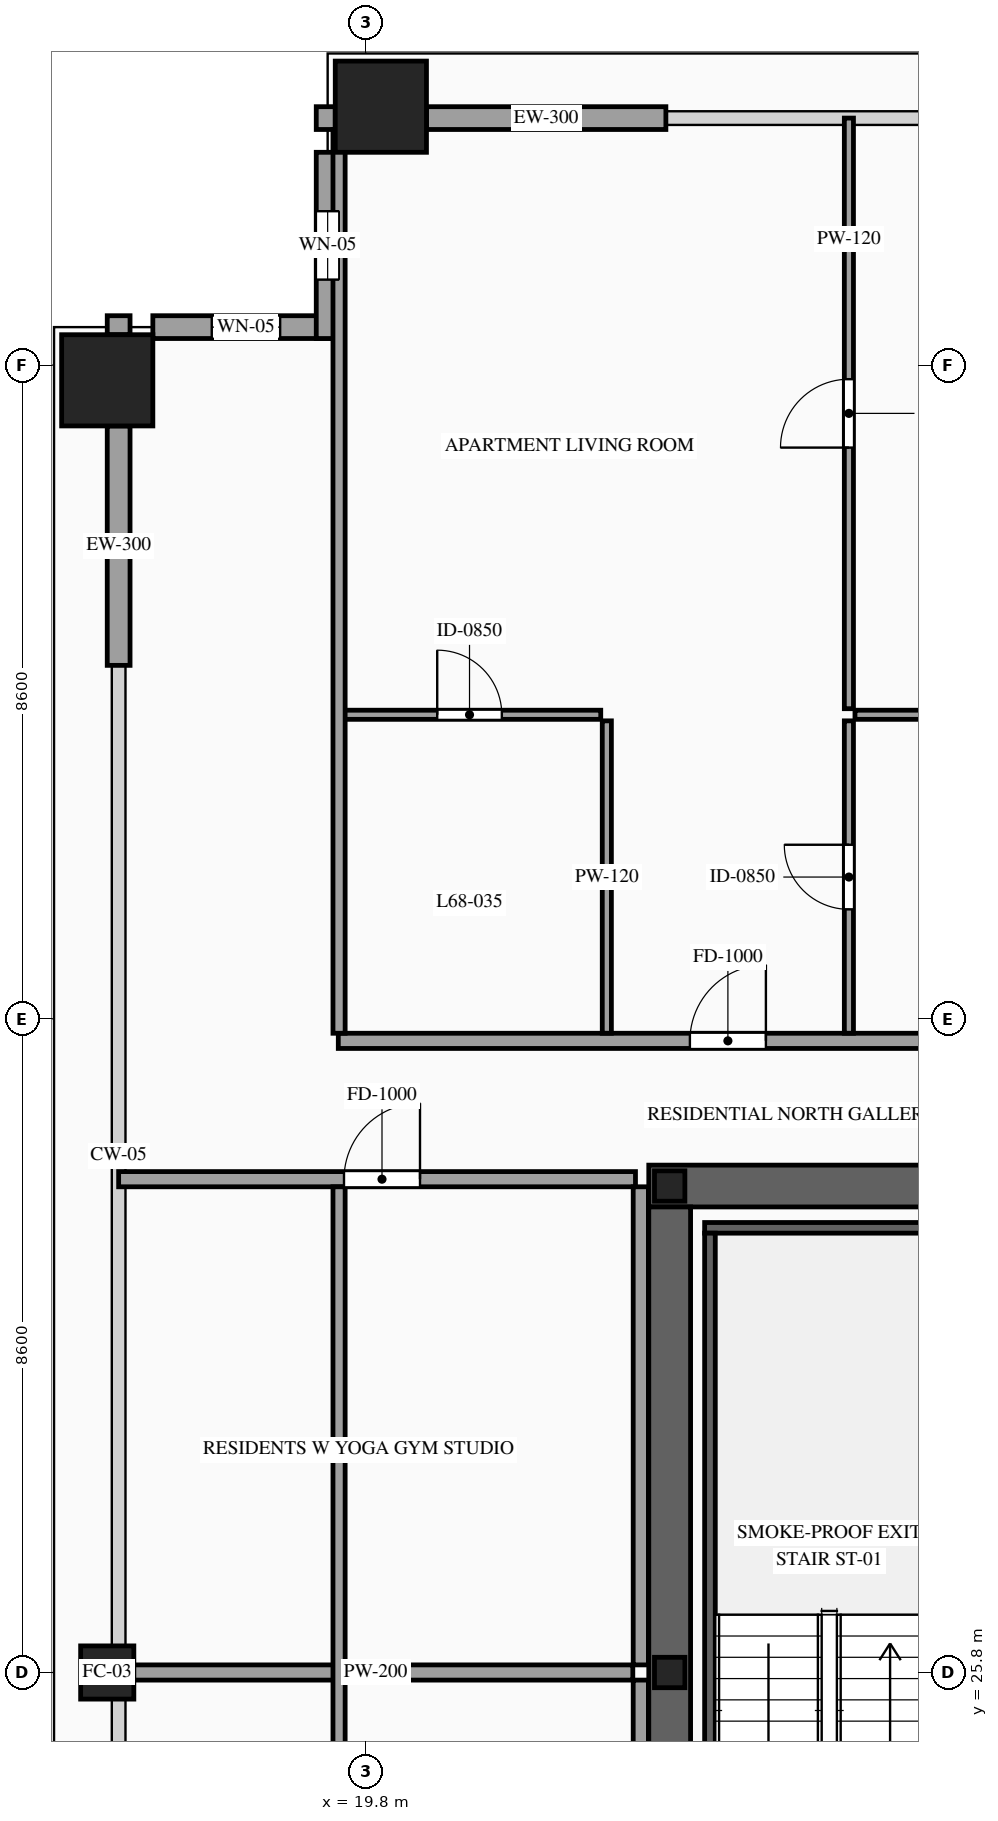
"""IFC4 building model, lengths in metres.
Left out: names, types, materials, properties, quantities, classifications, styles, units other than length and angle.
Written with IfcOpenShell. Run it as: python <this file> out.ifc"""

import sys

from ifc_helpers import new_model, si_unit, direction, frame, frame_2d, origin, origin_2d, place, context, subcontext, project, spatial, rectangle, hollow_rectangle, i_section, extrude, source, transform, mapped, element, fill, save


model = new_model("IFC4")
c1 = context("Model", 3, precision=1e-05, world=origin(), true_north=direction((0.0, 1.0)))
c2 = subcontext(c1, "Body", "Model", "MODEL_VIEW")
j1 = project(units=[si_unit("LENGTHUNIT", "METRE"), si_unit("PLANEANGLEUNIT", "RADIAN")], contexts=[c1])
p1 = place(None, origin())
s1 = spatial("IfcSite", under=j1, at=p1, CompositionType="ELEMENT")
p2 = place(p1, origin())
s2 = spatial("IfcBuilding", under=s1, at=p2, CompositionType="ELEMENT")
p3 = place(p2, frame((0.0, 0.0, 255.6)))
s3 = spatial("IfcBuildingStorey", under=s2, at=p3, CompositionType="ELEMENT", Elevation=255.6)
p4 = place(p3, frame((23.525, 32.2, 0.0), z_axis=(0.0, 0.0, 1.0), x_axis=(1.0, 0.0, 0.0)))
e1 = element("IfcWall", 1, at=p4, inside=s3, PredefinedType="SHEAR", context=c2, shape_type="SweptSolid", body=[
    extrude(rectangle(XDim=26.95, YDim=0.55, at=frame_2d((13.475, 0.0))), origin(), (0.0, 0.0, 1.0), 3.5),
])
p5 = place(p4, frame((4.545, 0.0, 0.0)))
e2 = element("IfcOpeningElement", 2, at=p5, cuts=e1, PredefinedType="OPENING", context=c2, shape_type="SweptSolid", body=[
    extrude(rectangle(XDim=0.9, YDim=2.15, at=frame_2d((0.45, 1.075))), frame((0.0, 0.29, 0.0), z_axis=(0.0, -1.0, 0.0), x_axis=(1.0, 0.0, 0.0)), (0.0, 0.0, 1.0), 0.58),
])
p6 = place(p4, frame((9.825, 0.0, 0.0)))
e3 = element("IfcOpeningElement", 3, at=p6, cuts=e1, PredefinedType="OPENING", context=c2, shape_type="SweptSolid", body=[
    extrude(rectangle(XDim=1.1, YDim=2.2, at=frame_2d((0.55, 1.1))), frame((0.0, 0.29, 0.0), z_axis=(0.0, -1.0, 0.0), x_axis=(1.0, 0.0, 0.0)), (0.0, 0.0, 1.0), 0.58),
])
p7 = place(p4, frame((15.675, 0.0, 0.0)))
e4 = element("IfcOpeningElement", 4, at=p7, cuts=e1, PredefinedType="OPENING", context=c2, shape_type="SweptSolid", body=[
    extrude(rectangle(XDim=1.1, YDim=2.2, at=frame_2d((0.55, 1.1))), frame((0.0, 0.29, 0.0), z_axis=(0.0, -1.0, 0.0), x_axis=(1.0, 0.0, 0.0)), (0.0, 0.0, 1.0), 0.58),
])
p8 = place(p4, frame((18.875, 0.0, 0.0)))
e5 = element("IfcOpeningElement", 5, at=p8, cuts=e1, PredefinedType="OPENING", context=c2, shape_type="SweptSolid", body=[
    extrude(rectangle(XDim=0.9, YDim=2.15, at=frame_2d((0.45, 1.075))), frame((0.0, 0.29, 0.0), z_axis=(0.0, -1.0, 0.0), x_axis=(1.0, 0.0, 0.0)), (0.0, 0.0, 1.0), 0.58),
])
m1 = source(origin(), c2, "Body", "SweptSolid", [
    extrude(rectangle(XDim=12.25, YDim=0.55, at=frame_2d((6.125, 0.0))), origin(), (0.0, 0.0, 1.0), 3.5),
])
p9 = place(p3, frame((23.8, 19.675, 0.0), z_axis=(0.0, 0.0, 1.0), x_axis=(0.0, 1.0, 0.0)))
e6 = element("IfcWall", 6, at=p9, inside=s3, PredefinedType="SHEAR", context=c2, shape_type="MappedRepresentation", body=[
    mapped(m1, transform((0.0, 0.0, 0.0), scale=1.0)),
])
m2 = source(origin(), c2, "Body", "SweptSolid", [
    extrude(i_section(OverallWidth=0.4, OverallDepth=0.4, WebThickness=0.013, FlangeThickness=0.021, at=origin_2d()), origin(), (0.0, 0.0, 1.0), 3.5),
])
for number, where, z_axis, x_axis in (
    (7, (23.8, 25.8, 0.0), (0.0, 0.0, 1.0), (1.0, 0.0, 0.0)),
    (8, (23.8, 32.2, 0.0), (0.0, 0.0, 1.0), (1.0, 0.0, 0.0)),
):
    element("IfcColumn", number, at=place(p3, frame(where, z_axis=z_axis, x_axis=x_axis)), inside=s3, PredefinedType="COLUMN", context=c2, shape_type="MappedRepresentation", body=[
        mapped(m2, transform((0.0, 0.0, 0.0), scale=1.0)),
    ])
m3 = source(origin(), c2, "Body", "SweptSolid", [
    extrude(hollow_rectangle(XDim=1.2, YDim=1.2, WallThickness=0.055, at=origin_2d()), origin(), (0.0, 0.0, 1.0), 3.5),
])
p10 = place(p3, frame((20.0, 46.4, 0.0), z_axis=(0.0, 0.0, 1.0), x_axis=(1.0, 0.0, 0.0)))
e9 = element("IfcColumn", 9, at=p10, inside=s3, PredefinedType="COLUMN", context=c2, shape_type="MappedRepresentation", body=[
    mapped(m3, transform((0.0, 0.0, 0.0), scale=1.0)),
])
m4 = source(origin(), c2, "Body", "SweptSolid", [
    extrude(hollow_rectangle(XDim=0.7, YDim=0.7, WallThickness=0.032, at=origin_2d()), origin(), (0.0, 0.0, 1.0), 3.5),
])
p11 = place(p3, frame((16.4, 25.8, 0.0), z_axis=(0.0, 0.0, 1.0), x_axis=(1.0, 0.0, 0.0)))
e10 = element("IfcColumn", 10, at=p11, inside=s3, PredefinedType="COLUMN", context=c2, shape_type="MappedRepresentation", body=[
    mapped(m4, transform((0.0, 0.0, 0.0), scale=1.0)),
])
p12 = place(p3, frame((16.4, 42.8, 0.0), z_axis=(0.0, 0.0, 1.0), x_axis=(1.0, 0.0, 0.0)))
e11 = element("IfcColumn", 11, at=p12, inside=s3, PredefinedType="COLUMN", context=c2, shape_type="MappedRepresentation", body=[
    mapped(m3, transform((0.0, 0.0, 0.0), scale=1.0)),
])
p13 = place(p3, frame((19.45, 43.5, 0.0), z_axis=(0.0, 0.0, 1.0), x_axis=(-1.0, 0.0, 0.0)))
e12 = element("IfcWall", 12, at=p13, inside=s3, PredefinedType="SOLIDWALL", context=c2, shape_type="SweptSolid", body=[
    extrude(rectangle(XDim=2.45, YDim=0.3, at=frame_2d((1.225, 0.0))), origin(), (0.0, 0.0, 1.0), 3.2),
])
p14 = place(p13, frame((0.775, 0.0, 0.75)))
e13 = element("IfcOpeningElement", 13, at=p14, cuts=e12, PredefinedType="OPENING", context=c2, shape_type="SweptSolid", body=[
    extrude(rectangle(XDim=0.9, YDim=1.5, at=frame_2d((0.45, 0.75))), frame((0.0, 0.165, 0.0), z_axis=(0.0, -1.0, 0.0), x_axis=(1.0, 0.0, 0.0)), (0.0, 0.0, 1.0), 0.33),
])
p15 = place(p3, frame((19.3, 45.8, 0.0), z_axis=(0.0, 0.0, 1.0), x_axis=(0.0, -1.0, 0.0)))
e14 = element("IfcWall", 14, at=p15, inside=s3, PredefinedType="SOLIDWALL", context=c2, shape_type="SweptSolid", body=[
    extrude(rectangle(XDim=2.45, YDim=0.3, at=frame_2d((1.225, 0.0))), origin(), (0.0, 0.0, 1.0), 3.2),
])
p16 = place(p15, frame((0.775, 0.0, 0.75)))
e15 = element("IfcOpeningElement", 15, at=p16, cuts=e14, PredefinedType="OPENING", context=c2, shape_type="SweptSolid", body=[
    extrude(rectangle(XDim=0.9, YDim=1.5, at=frame_2d((0.45, 0.75))), frame((0.0, 0.165, 0.0), z_axis=(0.0, -1.0, 0.0), x_axis=(1.0, 0.0, 0.0)), (0.0, 0.0, 1.0), 0.33),
])
m5 = source(origin(), c2, "Body", "SweptSolid", [
    extrude(rectangle(XDim=0.25, YDim=0.3, at=frame_2d((0.125, 0.0))), origin(), (0.0, 0.0, 1.0), 3.2),
])
for number, where, z_axis, x_axis in (
    (16, (19.15, 46.25, 0.0), (0.0, 0.0, 1.0), (1.0, 0.0, 0.0)),
    (17, (16.55, 43.4, 0.0), (0.0, 0.0, 1.0), (0.0, 1.0, 0.0)),
):
    element("IfcWall", number, at=place(p3, frame(where, z_axis=z_axis, x_axis=x_axis)), inside=s3, PredefinedType="SOLIDWALL", context=c2, shape_type="MappedRepresentation", body=[
        mapped(m5, transform((0.0, 0.0, 0.0), scale=1.0)),
    ])
m6 = source(origin(), c2, "Body", "SweptSolid", [
    extrude(rectangle(XDim=3.15, YDim=0.3, at=frame_2d((1.575, 0.0))), origin(), (0.0, 0.0, 1.0), 2.755),
])
for number, where, z_axis, x_axis in (
    (18, (20.6, 46.25, 0.0), (0.0, 0.0, 1.0), (1.0, 0.0, 0.0)),
    (19, (16.55, 39.05, 0.0), (0.0, 0.0, 1.0), (0.0, 1.0, 0.0)),
):
    element("IfcWall", number, at=place(p3, frame(where, z_axis=z_axis, x_axis=x_axis)), inside=s3, PredefinedType="SOLIDWALL", context=c2, shape_type="MappedRepresentation", body=[
        mapped(m6, transform((0.0, 0.0, 0.0), scale=1.0)),
    ])
m7 = source(origin(), c2, "Body", "SweptSolid", [
    extrude(rectangle(XDim=3.28, YDim=0.14, at=frame_2d((1.64, 0.0))), origin(), (0.0, 0.0, 1.0), 3.2),
])
p17 = place(p3, frame((24.26, 31.65, 0.0), z_axis=(0.0, 0.0, 1.0), x_axis=(1.0, 0.0, 0.0)))
e20 = element("IfcWall", 20, at=p17, inside=s3, PredefinedType="SOLIDWALL", context=c2, shape_type="MappedRepresentation", body=[
    mapped(m7, transform((0.0, 0.0, 0.0), scale=1.0)),
])
m8 = source(origin(), c2, "Body", "SweptSolid", [
    extrude(rectangle(XDim=8.94, YDim=0.14, at=frame_2d((4.47, 0.0))), origin(), (0.0, 0.0, 1.0), 3.2),
])
p18 = place(p3, frame((24.33, 22.64, 0.0), z_axis=(0.0, 0.0, 1.0), x_axis=(0.0, 1.0, 0.0)))
e21 = element("IfcWall", 21, at=p18, inside=s3, PredefinedType="SOLIDWALL", context=c2, shape_type="MappedRepresentation", body=[
    mapped(m8, transform((0.0, 0.0, 0.0), scale=1.0)),
])
p19 = place(p3, frame((19.44, 34.11, 0.0), z_axis=(0.0, 0.0, 1.0), x_axis=(1.0, 0.0, 0.0)))
e22 = element("IfcWall", 22, at=p19, inside=s3, PredefinedType="PARTITIONING", context=c2, shape_type="SweptSolid", body=[
    extrude(rectangle(XDim=11.51, YDim=0.2, at=frame_2d((5.755, 0.0))), origin(), (0.0, 0.0, 1.0), 3.2),
])
p20 = place(p19, frame((4.626, 0.0, 0.0)))
e23 = element("IfcOpeningElement", 23, at=p20, cuts=e22, PredefinedType="OPENING", context=c2, shape_type="SweptSolid", body=[
    extrude(rectangle(XDim=1.0, YDim=2.2, at=frame_2d((0.5, 1.1))), frame((0.0, 0.115, 0.0), z_axis=(0.0, -1.0, 0.0), x_axis=(1.0, 0.0, 0.0)), (0.0, 0.0, 1.0), 0.23),
])
p21 = place(p3, frame((19.44, 38.4, 0.0), z_axis=(0.0, 0.0, 1.0), x_axis=(1.0, 0.0, 0.0)))
e24 = element("IfcWall", 24, at=p21, inside=s3, PredefinedType="PARTITIONING", context=c2, shape_type="SweptSolid", body=[
    extrude(rectangle(XDim=3.453, YDim=0.12, at=frame_2d((1.727, 0.0))), origin(), (0.0, 0.0, 1.0), 3.2),
])
p22 = place(p21, frame((1.302, 0.0, 0.0)))
e25 = element("IfcOpeningElement", 25, at=p22, cuts=e24, PredefinedType="OPENING", context=c2, shape_type="SweptSolid", body=[
    extrude(rectangle(XDim=0.85, YDim=2.1, at=frame_2d((0.425, 1.05))), frame((0.0, 0.075, 0.0), z_axis=(0.0, -1.0, 0.0), x_axis=(1.0, 0.0, 0.0)), (0.0, 0.0, 1.0), 0.15),
])
m9 = source(origin(), c2, "Body", "SweptSolid", [
    extrude(rectangle(XDim=4.11, YDim=0.12, at=frame_2d((2.055, 0.0))), origin(), (0.0, 0.0, 1.0), 3.2),
])
p23 = place(p3, frame((22.973, 34.21, 0.0), z_axis=(0.0, 0.0, 1.0), x_axis=(0.0, 1.0, 0.0)))
e26 = element("IfcWall", 26, at=p23, inside=s3, PredefinedType="PARTITIONING", context=c2, shape_type="MappedRepresentation", body=[
    mapped(m9, transform((0.0, 0.0, 0.0), scale=1.0)),
])
m10 = source(origin(), c2, "Body", "SweptSolid", [
    extrude(rectangle(XDim=4.712, YDim=0.12, at=frame_2d((2.356, 0.0))), origin(), (0.0, 0.0, 1.0), 3.2),
])
p24 = place(p3, frame((26.238, 38.4, 0.0), z_axis=(0.0, 0.0, 1.0), x_axis=(1.0, 0.0, 0.0)))
e27 = element("IfcWall", 27, at=p24, inside=s3, PredefinedType="PARTITIONING", context=c2, shape_type="MappedRepresentation", body=[
    mapped(m10, transform((0.0, 0.0, 0.0), scale=1.0)),
])
p25 = place(p3, frame((26.158, 38.48, 0.0), z_axis=(0.0, 0.0, 1.0), x_axis=(0.0, 1.0, 0.0)))
e28 = element("IfcWall", 28, at=p25, inside=s3, PredefinedType="PARTITIONING", context=c2, shape_type="SweptSolid", body=[
    extrude(rectangle(XDim=7.77, YDim=0.12, at=frame_2d((3.885, 0.0))), origin(), (0.0, 0.0, 1.0), 3.2),
])
p26 = place(p25, frame((3.435, 0.0, 0.0)))
e29 = element("IfcOpeningElement", 29, at=p26, cuts=e28, PredefinedType="OPENING", context=c2, shape_type="SweptSolid", body=[
    extrude(rectangle(XDim=0.9, YDim=2.15, at=frame_2d((0.45, 1.075))), frame((0.0, 0.075, 0.0), z_axis=(0.0, -1.0, 0.0), x_axis=(1.0, 0.0, 0.0)), (0.0, 0.0, 1.0), 0.15),
])
p27 = place(p3, frame((26.158, 34.21, 0.0), z_axis=(0.0, 0.0, 1.0), x_axis=(0.0, 1.0, 0.0)))
e30 = element("IfcWall", 30, at=p27, inside=s3, PredefinedType="PARTITIONING", context=c2, shape_type="SweptSolid", body=[
    extrude(rectangle(XDim=4.11, YDim=0.12, at=frame_2d((2.055, 0.0))), origin(), (0.0, 0.0, 1.0), 3.2),
])
p28 = place(p27, frame((1.63, 0.0, 0.0)))
e31 = element("IfcOpeningElement", 31, at=p28, cuts=e30, PredefinedType="OPENING", context=c2, shape_type="SweptSolid", body=[
    extrude(rectangle(XDim=0.85, YDim=2.1, at=frame_2d((0.425, 1.05))), frame((0.0, 0.075, 0.0), z_axis=(0.0, -1.0, 0.0), x_axis=(1.0, 0.0, 0.0)), (0.0, 0.0, 1.0), 0.15),
])
m11 = source(origin(), c2, "Body", "SweptSolid", [
    extrude(rectangle(XDim=11.89, YDim=0.16, at=frame_2d((5.945, 0.0))), origin(), (0.0, 0.0, 1.0), 3.2),
])
p29 = place(p3, frame((19.45, 34.21, 0.0), z_axis=(0.0, 0.0, 1.0), x_axis=(0.0, 1.0, 0.0)))
e32 = element("IfcWall", 32, at=p29, inside=s3, PredefinedType="PARTITIONING", context=c2, shape_type="MappedRepresentation", body=[
    mapped(m11, transform((0.0, 0.0, 0.0), scale=1.0)),
])
m12 = source(origin(), c2, "Body", "SweptSolid", [
    extrude(rectangle(XDim=6.765, YDim=0.2, at=frame_2d((3.382, 0.0))), origin(), (0.0, 0.0, 1.0), 2.707),
])
p30 = place(p3, frame((16.55, 25.8, 0.0), z_axis=(0.0, 0.0, 1.0), x_axis=(1.0, 0.0, 0.0)))
e33 = element("IfcWall", 33, at=p30, inside=s3, PredefinedType="PARTITIONING", context=c2, shape_type="MappedRepresentation", body=[
    mapped(m12, transform((0.0, 0.0, 0.0), scale=1.0)),
])
m13 = source(origin(), c2, "Body", "SweptSolid", [
    extrude(rectangle(XDim=6.29, YDim=0.2, at=frame_2d((3.145, 0.0))), origin(), (0.0, 0.0, 1.0), 3.2),
])
p31 = place(p3, frame((23.42, 19.41, 0.0), z_axis=(0.0, 0.0, 1.0), x_axis=(0.0, 1.0, 0.0)))
e34 = element("IfcWall", 34, at=p31, inside=s3, PredefinedType="PARTITIONING", context=c2, shape_type="MappedRepresentation", body=[
    mapped(m13, transform((0.0, 0.0, 0.0), scale=1.0)),
])
p32 = place(p3, frame((16.55, 32.29, 0.0), z_axis=(0.0, 0.0, 1.0), x_axis=(1.0, 0.0, 0.0)))
e35 = element("IfcWall", 35, at=p32, inside=s3, PredefinedType="PARTITIONING", context=c2, shape_type="SweptSolid", body=[
    extrude(rectangle(XDim=6.8, YDim=0.2, at=frame_2d((3.4, 0.0))), origin(), (0.0, 0.0, 1.0), 2.745),
])
p33 = place(p32, frame((2.965, 0.0, 0.0)))
e36 = element("IfcOpeningElement", 36, at=p33, cuts=e35, PredefinedType="OPENING", context=c2, shape_type="SweptSolid", body=[
    extrude(rectangle(XDim=1.0, YDim=2.2, at=frame_2d((0.5, 1.1))), frame((0.0, 0.115, 0.0), z_axis=(0.0, -1.0, 0.0), x_axis=(1.0, 0.0, 0.0)), (0.0, 0.0, 1.0), 0.23),
])
m14 = source(origin(), c2, "Body", "SweptSolid", [
    extrude(rectangle(XDim=26.69, YDim=0.16, at=frame_2d((13.345, 0.0))), origin(), (0.0, 0.0, 1.0), 3.2),
])
p34 = place(p3, frame((19.45, 5.5, 0.0), z_axis=(0.0, 0.0, 1.0), x_axis=(0.0, 1.0, 0.0)))
e37 = element("IfcWall", 37, at=p34, inside=s3, PredefinedType="PARTITIONING", context=c2, shape_type="MappedRepresentation", body=[
    mapped(m14, transform((0.0, 0.0, 0.0), scale=1.0)),
])
p35 = place(p3, frame((23.42, 25.9, 0.0), z_axis=(0.0, 0.0, 1.0), x_axis=(0.0, 1.0, 0.0)))
e38 = element("IfcWall", 38, at=p35, inside=s3, PredefinedType="PARTITIONING", context=c2, shape_type="MappedRepresentation", body=[
    mapped(m13, transform((0.0, 0.0, 0.0), scale=1.0)),
])
m15 = source(origin(), c2, "Body", "SweptSolid", [
    extrude(rectangle(XDim=0.9, YDim=1.5, at=frame_2d((0.45, 0.75))), frame((0.0, 0.03, 0.0), z_axis=(0.0, -1.0, 0.0), x_axis=(1.0, 0.0, 0.0)), (0.0, 0.0, 1.0), 0.06),
])
p36 = place(p14, origin())
e39 = element("IfcWindow", 39, at=p36, inside=s3, PartitioningType="SINGLE_PANEL", PredefinedType="WINDOW", context=c2, shape_type="MappedRepresentation", body=[
    mapped(m15, transform((0.0, 0.0, 0.0), scale=1.0)),
])
fill(e13, e39)
p37 = place(p16, origin())
e40 = element("IfcWindow", 40, at=p37, inside=s3, PartitioningType="SINGLE_PANEL", PredefinedType="WINDOW", context=c2, shape_type="MappedRepresentation", body=[
    mapped(m15, transform((0.0, 0.0, 0.0), scale=1.0)),
])
fill(e15, e40)
m16 = source(origin(), c2, "Body", "SweptSolid", [
    extrude(rectangle(XDim=1.0, YDim=2.2, at=frame_2d((0.5, 1.1))), frame((0.0, 0.025, 0.0), z_axis=(0.0, -1.0, 0.0), x_axis=(1.0, 0.0, 0.0)), (0.0, 0.0, 1.0), 0.05),
])
p38 = place(p20, origin())
e41 = element("IfcDoor", 41, at=p38, inside=s3, OperationType="SINGLE_SWING_RIGHT", PredefinedType="DOOR", context=c2, shape_type="MappedRepresentation", body=[
    mapped(m16, transform((0.0, 0.0, 0.0), scale=1.0)),
])
fill(e23, e41)
m17 = source(origin(), c2, "Body", "SweptSolid", [
    extrude(rectangle(XDim=0.85, YDim=2.1, at=frame_2d((0.425, 1.05))), frame((0.0, 0.025, 0.0), z_axis=(0.0, -1.0, 0.0), x_axis=(1.0, 0.0, 0.0)), (0.0, 0.0, 1.0), 0.05),
])
p39 = place(p22, origin())
e42 = element("IfcDoor", 42, at=p39, inside=s3, OperationType="SINGLE_SWING_LEFT", PredefinedType="DOOR", context=c2, shape_type="MappedRepresentation", body=[
    mapped(m17, transform((0.0, 0.0, 0.0), scale=1.0)),
])
fill(e25, e42)
m18 = source(origin(), c2, "Body", "SweptSolid", [
    extrude(rectangle(XDim=0.9, YDim=2.15, at=frame_2d((0.45, 1.075))), frame((0.0, 0.025, 0.0), z_axis=(0.0, -1.0, 0.0), x_axis=(1.0, 0.0, 0.0)), (0.0, 0.0, 1.0), 0.05),
])
p40 = place(p26, origin())
e43 = element("IfcDoor", 43, at=p40, inside=s3, OperationType="SINGLE_SWING_LEFT", PredefinedType="DOOR", context=c2, shape_type="MappedRepresentation", body=[
    mapped(m18, transform((0.0, 0.0, 0.0), scale=1.0)),
])
fill(e29, e43)
p41 = place(p28, origin())
e44 = element("IfcDoor", 44, at=p41, inside=s3, OperationType="SINGLE_SWING_RIGHT", PredefinedType="DOOR", context=c2, shape_type="MappedRepresentation", body=[
    mapped(m17, transform((0.0, 0.0, 0.0), scale=1.0)),
])
fill(e31, e44)
p42 = place(p33, origin())
e45 = element("IfcDoor", 45, at=p42, inside=s3, OperationType="SINGLE_SWING_RIGHT", PredefinedType="DOOR", context=c2, shape_type="MappedRepresentation", body=[
    mapped(m16, transform((0.0, 0.0, 0.0), scale=1.0)),
])
fill(e36, e45)
save(model, sys.argv[1])
